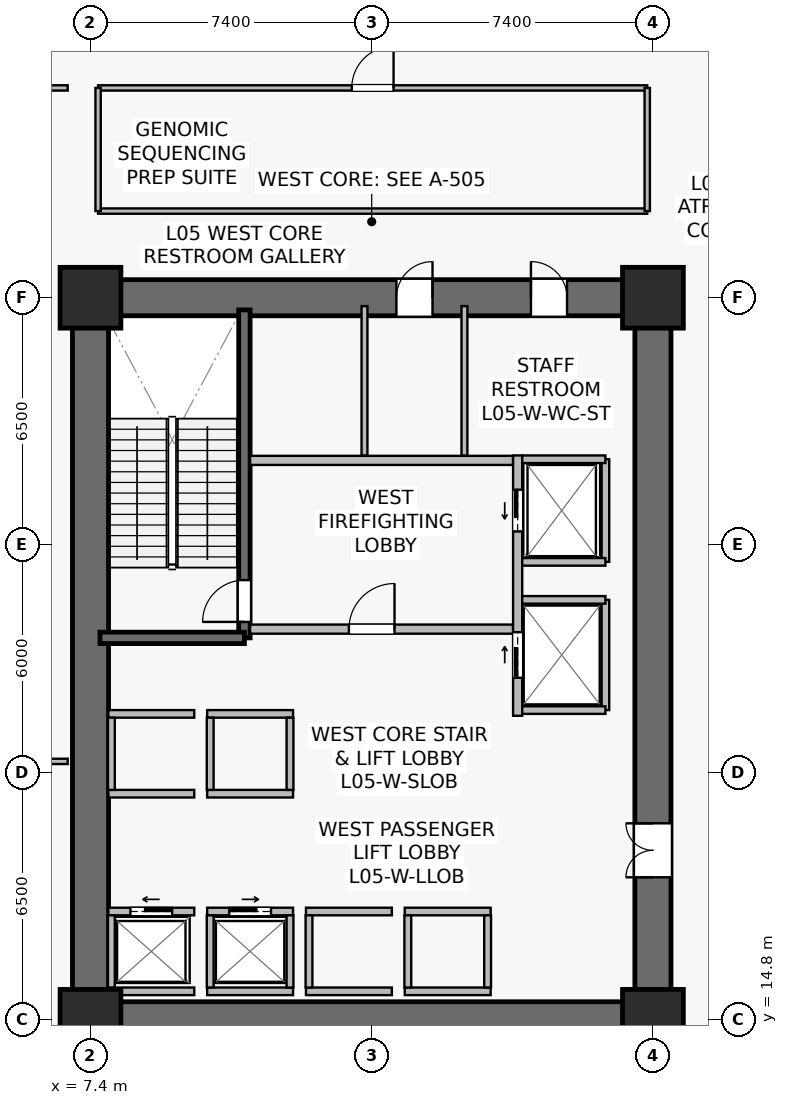
"""IFC4 building model, lengths in metres.
Left out: names, types, materials, properties, quantities, classifications, styles, units other than length and angle.
Written with IfcOpenShell. Run it as: python <this file> out.ifc"""

import sys

from ifc_helpers import new_model, si_unit, direction, frame, frame_2d, origin, origin_2d, place, context, subcontext, project, spatial, rectangle, extrude, source, transform, mapped, element, fill, save


model = new_model("IFC4")
c1 = context("Model", 3, precision=1e-05, world=origin(), true_north=direction((0.0, 1.0)))
c2 = subcontext(c1, "Body", "Model", "MODEL_VIEW")
j1 = project(units=[si_unit("LENGTHUNIT", "METRE"), si_unit("PLANEANGLEUNIT", "RADIAN")], contexts=[c1])
p1 = place(None, origin())
s1 = spatial("IfcSite", under=j1, at=p1, CompositionType="ELEMENT")
p2 = place(p1, origin())
s2 = spatial("IfcBuilding", under=s1, at=p2, CompositionType="ELEMENT")
p3 = place(p2, frame((0.0, 0.0, 19.8)))
s3 = spatial("IfcBuildingStorey", under=s2, at=p3, CompositionType="ELEMENT", Elevation=19.8)
p4 = place(p3, frame((6.925, 14.8, 0.0), z_axis=(0.0, 0.0, 1.0), x_axis=(1.0, 0.0, 0.0)))
e1 = element("IfcWall", 1, at=p4, inside=s3, PredefinedType="SHEAR", context=c2, shape_type="SweptSolid", body=[
    extrude(rectangle(XDim=15.75, YDim=0.95, at=frame_2d((7.875, 0.0))), origin(), (0.0, 0.0, 1.0), 5.08),
])
p5 = place(p3, frame((6.925, 33.8, 0.0), z_axis=(0.0, 0.0, 1.0), x_axis=(1.0, 0.0, 0.0)))
e2 = element("IfcWall", 2, at=p5, inside=s3, PredefinedType="SHEAR", context=c2, shape_type="SweptSolid", body=[
    extrude(rectangle(XDim=15.75, YDim=0.95, at=frame_2d((7.875, 0.0))), origin(), (0.0, 0.0, 1.0), 5.08),
])
p6 = place(p5, frame((8.525, 0.0, 0.0)))
e3 = element("IfcOpeningElement", 3, at=p6, cuts=e2, PredefinedType="OPENING", context=c2, shape_type="SweptSolid", body=[
    extrude(rectangle(XDim=0.95, YDim=2.15, at=frame_2d((0.475, 1.075))), frame((0.0, 0.485, 0.0), z_axis=(0.0, -1.0, 0.0), x_axis=(1.0, 0.0, 0.0)), (0.0, 0.0, 1.0), 0.97),
])
p7 = place(p5, frame((12.065, 0.0, 0.0)))
e4 = element("IfcOpeningElement", 4, at=p7, cuts=e2, PredefinedType="OPENING", context=c2, shape_type="SweptSolid", body=[
    extrude(rectangle(XDim=0.95, YDim=2.15, at=frame_2d((0.475, 1.075))), frame((0.0, 0.485, 0.0), z_axis=(0.0, -1.0, 0.0), x_axis=(1.0, 0.0, 0.0)), (0.0, 0.0, 1.0), 0.97),
])
p8 = place(p3, frame((7.4, 15.275, 0.0), z_axis=(0.0, 0.0, 1.0), x_axis=(0.0, 1.0, 0.0)))
e5 = element("IfcWall", 5, at=p8, inside=s3, PredefinedType="SHEAR", context=c2, shape_type="SweptSolid", body=[
    extrude(rectangle(XDim=18.05, YDim=0.95, at=frame_2d((9.025, 0.0))), origin(), (0.0, 0.0, 1.0), 5.08),
])
p9 = place(p3, frame((22.2, 15.275, 0.0), z_axis=(0.0, 0.0, 1.0), x_axis=(0.0, 1.0, 0.0)))
e6 = element("IfcWall", 6, at=p9, inside=s3, PredefinedType="SHEAR", context=c2, shape_type="SweptSolid", body=[
    extrude(rectangle(XDim=18.05, YDim=0.95, at=frame_2d((9.025, 0.0))), origin(), (0.0, 0.0, 1.0), 5.08),
])
p10 = place(p9, frame((3.275, 0.0, 0.0)))
e7 = element("IfcOpeningElement", 7, at=p10, cuts=e6, PredefinedType="OPENING", context=c2, shape_type="SweptSolid", body=[
    extrude(rectangle(XDim=1.42, YDim=2.2, at=frame_2d((0.71, 1.1))), frame((0.0, 0.485, 0.0), z_axis=(0.0, -1.0, 0.0), x_axis=(1.0, 0.0, 0.0)), (0.0, 0.0, 1.0), 0.97),
])
p11 = place(p3, frame((11.45, 24.85, 0.0), z_axis=(0.0, 0.0, 1.0), x_axis=(0.0, 1.0, 0.0)))
e8 = element("IfcWall", 8, at=p11, inside=s3, PredefinedType="SHEAR", context=c2, shape_type="SweptSolid", body=[
    extrude(rectangle(XDim=8.63, YDim=0.3, at=frame_2d((4.315, 0.0))), origin(), (0.0, 0.0, 1.0), 5.08),
])
p12 = place(p11, frame((0.42, 0.0, 0.0)))
e9 = element("IfcOpeningElement", 9, at=p12, cuts=e8, PredefinedType="OPENING", context=c2, shape_type="SweptSolid", body=[
    extrude(rectangle(XDim=1.1, YDim=2.15, at=frame_2d((0.55, 1.075))), frame((0.0, 0.16, 0.0), z_axis=(0.0, -1.0, 0.0), x_axis=(1.0, 0.0, 0.0)), (0.0, 0.0, 1.0), 0.32),
])
p13 = place(p3, frame((7.65, 24.85, 0.0), z_axis=(0.0, 0.0, 1.0), x_axis=(1.0, 0.0, 0.0)))
e10 = element("IfcWall", 10, at=p13, inside=s3, PredefinedType="SHEAR", context=c2, shape_type="SweptSolid", body=[
    extrude(rectangle(XDim=3.8, YDim=0.3, at=frame_2d((1.9, 0.0))), origin(), (0.0, 0.0, 1.0), 5.08),
])
m1 = source(origin(), c2, "Body", "SweptSolid", [
    extrude(rectangle(XDim=1.6, YDim=1.6, at=origin_2d()), origin(), (0.0, 0.0, 1.0), 5.4),
])
for number, where, z_axis, x_axis in (
    (11, (7.4, 14.8, 0.0), (0.0, 0.0, 1.0), (1.0, 0.0, 0.0)),
    (12, (22.2, 14.8, 0.0), (0.0, 0.0, 1.0), (1.0, 0.0, 0.0)),
    (13, (7.4, 33.8, 0.0), (0.0, 0.0, 1.0), (1.0, 0.0, 0.0)),
    (14, (22.2, 33.8, 0.0), (0.0, 0.0, 1.0), (1.0, 0.0, 0.0)),
):
    element("IfcColumn", number, at=place(p3, frame(where, z_axis=z_axis, x_axis=x_axis)), inside=s3, PredefinedType="COLUMN", context=c2, shape_type="MappedRepresentation", body=[
        mapped(m1, transform((0.0, 0.0, 0.0), scale=1.0)),
    ])
p14 = place(p3, frame((11.6, 25.08, 0.0), z_axis=(0.0, 0.0, 1.0), x_axis=(1.0, 0.0, 0.0)))
e15 = element("IfcWall", 15, at=p14, inside=s3, PredefinedType="SOLIDWALL", context=c2, shape_type="SweptSolid", body=[
    extrude(rectangle(XDim=6.92, YDim=0.24, at=frame_2d((3.46, 0.0))), origin(), (0.0, 0.0, 1.0), 4.365),
])
p15 = place(p14, frame((2.6, 0.0, 0.0)))
e16 = element("IfcOpeningElement", 16, at=p15, cuts=e15, PredefinedType="OPENING", context=c2, shape_type="SweptSolid", body=[
    extrude(rectangle(XDim=1.2, YDim=2.16, at=frame_2d((0.6, 1.08))), frame((0.0, 0.13, 0.0), z_axis=(0.0, -1.0, 0.0), x_axis=(1.0, 0.0, 0.0)), (0.0, 0.0, 1.0), 0.26),
])
p16 = place(p3, frame((11.6, 29.52, 0.0), z_axis=(0.0, 0.0, 1.0), x_axis=(1.0, 0.0, 0.0)))
e17 = element("IfcWall", 17, at=p16, inside=s3, PredefinedType="SOLIDWALL", context=c2, shape_type="SweptSolid", body=[
    extrude(rectangle(XDim=6.92, YDim=0.24, at=frame_2d((3.46, 0.0))), origin(), (0.0, 0.0, 1.0), 4.365),
])
p17 = place(p3, frame((18.64, 22.8, 0.0), z_axis=(0.0, 0.0, 1.0), x_axis=(0.0, 1.0, 0.0)))
e18 = element("IfcWall", 18, at=p17, inside=s3, PredefinedType="SOLIDWALL", context=c2, shape_type="SweptSolid", body=[
    extrude(rectangle(XDim=6.85, YDim=0.24, at=frame_2d((3.425, 0.0))), origin(), (0.0, 0.0, 1.0), 4.165),
])
p18 = place(p17, frame((4.85, 0.0, 0.0)))
e19 = element("IfcOpeningElement", 19, at=p18, cuts=e18, PredefinedType="OPENING", context=c2, shape_type="SweptSolid", body=[
    extrude(rectangle(XDim=1.1, YDim=2.22, at=frame_2d((0.55, 1.11))), frame((0.0, 0.13, 0.0), z_axis=(0.0, -1.0, 0.0), x_axis=(1.0, 0.0, 0.0)), (0.0, 0.0, 1.0), 0.26),
])
p19 = place(p17, frame((1.0, 0.0, 0.0)))
e20 = element("IfcOpeningElement", 20, at=p19, cuts=e18, PredefinedType="OPENING", context=c2, shape_type="SweptSolid", body=[
    extrude(rectangle(XDim=1.2, YDim=2.22, at=frame_2d((0.6, 1.11))), frame((0.0, 0.13, 0.0), z_axis=(0.0, -1.0, 0.0), x_axis=(1.0, 0.0, 0.0)), (0.0, 0.0, 1.0), 0.26),
])
p20 = place(p3, frame((7.87, 17.65, 0.0), z_axis=(0.0, 0.0, 1.0), x_axis=(1.0, 0.0, 0.0)))
e21 = element("IfcWall", 21, at=p20, inside=s3, PredefinedType="SOLIDWALL", context=c2, shape_type="SweptSolid", body=[
    extrude(rectangle(XDim=2.26, YDim=0.2, at=frame_2d((1.13, 0.0))), origin(), (0.0, 0.0, 1.0), 5.08),
])
p21 = place(p20, frame((0.58, 0.0, 0.0)))
e22 = element("IfcOpeningElement", 22, at=p21, cuts=e21, PredefinedType="OPENING", context=c2, shape_type="SweptSolid", body=[
    extrude(rectangle(XDim=1.1, YDim=2.22, at=frame_2d((0.55, 1.11))), frame((0.0, 0.11, 0.0), z_axis=(0.0, -1.0, 0.0), x_axis=(1.0, 0.0, 0.0)), (0.0, 0.0, 1.0), 0.22),
])
p22 = place(p3, frame((7.87, 15.55, 0.0), z_axis=(0.0, 0.0, 1.0), x_axis=(1.0, 0.0, 0.0)))
e23 = element("IfcWall", 23, at=p22, inside=s3, PredefinedType="SOLIDWALL", context=c2, shape_type="SweptSolid", body=[
    extrude(rectangle(XDim=2.26, YDim=0.2, at=frame_2d((1.13, 0.0))), origin(), (0.0, 0.0, 1.0), 5.08),
])
p23 = place(p3, frame((7.95, 15.65, 0.0), z_axis=(0.0, 0.0, 1.0), x_axis=(0.0, 1.0, 0.0)))
e24 = element("IfcWall", 24, at=p23, inside=s3, PredefinedType="SOLIDWALL", context=c2, shape_type="SweptSolid", body=[
    extrude(rectangle(XDim=1.9, YDim=0.18, at=frame_2d((0.95, 0.0))), origin(), (0.0, 0.0, 1.0), 5.08),
])
p24 = place(p3, frame((10.47, 17.65, 0.0), z_axis=(0.0, 0.0, 1.0), x_axis=(1.0, 0.0, 0.0)))
e25 = element("IfcWall", 25, at=p24, inside=s3, PredefinedType="SOLIDWALL", context=c2, shape_type="SweptSolid", body=[
    extrude(rectangle(XDim=2.26, YDim=0.2, at=frame_2d((1.13, 0.0))), origin(), (0.0, 0.0, 1.0), 5.08),
])
p25 = place(p24, frame((0.58, 0.0, 0.0)))
e26 = element("IfcOpeningElement", 26, at=p25, cuts=e25, PredefinedType="OPENING", context=c2, shape_type="SweptSolid", body=[
    extrude(rectangle(XDim=1.1, YDim=2.22, at=frame_2d((0.55, 1.11))), frame((0.0, 0.11, 0.0), z_axis=(0.0, -1.0, 0.0), x_axis=(1.0, 0.0, 0.0)), (0.0, 0.0, 1.0), 0.22),
])
p26 = place(p3, frame((10.47, 15.55, 0.0), z_axis=(0.0, 0.0, 1.0), x_axis=(1.0, 0.0, 0.0)))
e27 = element("IfcWall", 27, at=p26, inside=s3, PredefinedType="SOLIDWALL", context=c2, shape_type="SweptSolid", body=[
    extrude(rectangle(XDim=2.26, YDim=0.2, at=frame_2d((1.13, 0.0))), origin(), (0.0, 0.0, 1.0), 5.08),
])
for number, where, z_axis, x_axis in (
    (28, (10.55, 15.65, 0.0), (0.0, 0.0, 1.0), (0.0, 1.0, 0.0)),
    (29, (12.65, 15.65, 0.0), (0.0, 0.0, 1.0), (0.0, 1.0, 0.0)),
):
    element("IfcWall", number, at=place(p3, frame(where, z_axis=z_axis, x_axis=x_axis)), inside=s3, PredefinedType="SOLIDWALL", context=c2, shape_type="SweptSolid", body=[
        extrude(rectangle(XDim=1.9, YDim=0.18, at=frame_2d((0.95, 0.0))), origin(), (0.0, 0.0, 1.0), 5.08),
    ])
for number, where, z_axis, x_axis in (
    (30, (13.07, 17.65, 0.0), (0.0, 0.0, 1.0), (1.0, 0.0, 0.0)),
    (31, (13.07, 15.55, 0.0), (0.0, 0.0, 1.0), (1.0, 0.0, 0.0)),
):
    element("IfcWall", number, at=place(p3, frame(where, z_axis=z_axis, x_axis=x_axis)), inside=s3, PredefinedType="SOLIDWALL", context=c2, shape_type="SweptSolid", body=[
        extrude(rectangle(XDim=2.26, YDim=0.2, at=frame_2d((1.13, 0.0))), origin(), (0.0, 0.0, 1.0), 4.365),
    ])
p27 = place(p3, frame((13.15, 15.65, 0.0), z_axis=(0.0, 0.0, 1.0), x_axis=(0.0, 1.0, 0.0)))
e32 = element("IfcWall", 32, at=p27, inside=s3, PredefinedType="SOLIDWALL", context=c2, shape_type="SweptSolid", body=[
    extrude(rectangle(XDim=1.9, YDim=0.18, at=frame_2d((0.95, 0.0))), origin(), (0.0, 0.0, 1.0), 5.08),
])
for number, where, z_axis, x_axis in (
    (33, (15.67, 17.65, 0.0), (0.0, 0.0, 1.0), (1.0, 0.0, 0.0)),
    (34, (15.67, 15.55, 0.0), (0.0, 0.0, 1.0), (1.0, 0.0, 0.0)),
):
    element("IfcWall", number, at=place(p3, frame(where, z_axis=z_axis, x_axis=x_axis)), inside=s3, PredefinedType="SOLIDWALL", context=c2, shape_type="SweptSolid", body=[
        extrude(rectangle(XDim=2.26, YDim=0.2, at=frame_2d((1.13, 0.0))), origin(), (0.0, 0.0, 1.0), 5.08),
    ])
for number, where, z_axis, x_axis in (
    (35, (15.75, 15.65, 0.0), (0.0, 0.0, 1.0), (0.0, 1.0, 0.0)),
    (36, (17.85, 15.65, 0.0), (0.0, 0.0, 1.0), (0.0, 1.0, 0.0)),
):
    element("IfcWall", number, at=place(p3, frame(where, z_axis=z_axis, x_axis=x_axis)), inside=s3, PredefinedType="SOLIDWALL", context=c2, shape_type="SweptSolid", body=[
        extrude(rectangle(XDim=1.9, YDim=0.18, at=frame_2d((0.95, 0.0))), origin(), (0.0, 0.0, 1.0), 5.08),
    ])
for number, where, z_axis, x_axis in (
    (37, (7.87, 20.75, 0.0), (0.0, 0.0, 1.0), (1.0, 0.0, 0.0)),
    (38, (7.87, 22.85, 0.0), (0.0, 0.0, 1.0), (1.0, 0.0, 0.0)),
):
    element("IfcWall", number, at=place(p3, frame(where, z_axis=z_axis, x_axis=x_axis)), inside=s3, PredefinedType="SOLIDWALL", context=c2, shape_type="SweptSolid", body=[
        extrude(rectangle(XDim=2.26, YDim=0.2, at=frame_2d((1.13, 0.0))), origin(), (0.0, 0.0, 1.0), 5.08),
    ])
p28 = place(p3, frame((7.95, 20.85, 0.0), z_axis=(0.0, 0.0, 1.0), x_axis=(0.0, 1.0, 0.0)))
e39 = element("IfcWall", 39, at=p28, inside=s3, PredefinedType="SOLIDWALL", context=c2, shape_type="SweptSolid", body=[
    extrude(rectangle(XDim=1.9, YDim=0.18, at=frame_2d((0.95, 0.0))), origin(), (0.0, 0.0, 1.0), 5.08),
])
for number, where, z_axis, x_axis in (
    (40, (10.47, 20.75, 0.0), (0.0, 0.0, 1.0), (1.0, 0.0, 0.0)),
    (41, (10.47, 22.85, 0.0), (0.0, 0.0, 1.0), (1.0, 0.0, 0.0)),
):
    element("IfcWall", number, at=place(p3, frame(where, z_axis=z_axis, x_axis=x_axis)), inside=s3, PredefinedType="SOLIDWALL", context=c2, shape_type="SweptSolid", body=[
        extrude(rectangle(XDim=2.26, YDim=0.2, at=frame_2d((1.13, 0.0))), origin(), (0.0, 0.0, 1.0), 5.08),
    ])
for number, where, z_axis, x_axis in (
    (42, (10.55, 20.85, 0.0), (0.0, 0.0, 1.0), (0.0, 1.0, 0.0)),
    (43, (12.65, 20.85, 0.0), (0.0, 0.0, 1.0), (0.0, 1.0, 0.0)),
):
    element("IfcWall", number, at=place(p3, frame(where, z_axis=z_axis, x_axis=x_axis)), inside=s3, PredefinedType="SOLIDWALL", context=c2, shape_type="SweptSolid", body=[
        extrude(rectangle(XDim=1.9, YDim=0.18, at=frame_2d((0.95, 0.0))), origin(), (0.0, 0.0, 1.0), 5.08),
    ])
p29 = place(p3, frame((20.95, 26.85, 0.0), z_axis=(0.0, 0.0, 1.0), x_axis=(0.0, 1.0, 0.0)))
e44 = element("IfcWall", 44, at=p29, inside=s3, PredefinedType="SOLIDWALL", context=c2, shape_type="SweptSolid", body=[
    extrude(rectangle(XDim=2.7, YDim=0.2, at=frame_2d((1.35, 0.0))), origin(), (0.0, 0.0, 1.0), 5.08),
])
p30 = place(p3, frame((18.76, 29.55, 0.0), z_axis=(0.0, 0.0, 1.0), x_axis=(1.0, 0.0, 0.0)))
e45 = element("IfcWall", 45, at=p30, inside=s3, PredefinedType="SOLIDWALL", context=c2, shape_type="SweptSolid", body=[
    extrude(rectangle(XDim=2.19, YDim=0.2, at=frame_2d((1.095, 0.0))), origin(), (0.0, 0.0, 1.0), 5.08),
])
p31 = place(p3, frame((18.76, 26.85, 0.0), z_axis=(0.0, 0.0, 1.0), x_axis=(1.0, 0.0, 0.0)))
e46 = element("IfcWall", 46, at=p31, inside=s3, PredefinedType="SOLIDWALL", context=c2, shape_type="SweptSolid", body=[
    extrude(rectangle(XDim=2.19, YDim=0.2, at=frame_2d((1.095, 0.0))), origin(), (0.0, 0.0, 1.0), 4.477),
])
p32 = place(p3, frame((20.95, 22.95, 0.0), z_axis=(0.0, 0.0, 1.0), x_axis=(0.0, 1.0, 0.0)))
e47 = element("IfcWall", 47, at=p32, inside=s3, PredefinedType="SOLIDWALL", context=c2, shape_type="SweptSolid", body=[
    extrude(rectangle(XDim=2.9, YDim=0.2, at=frame_2d((1.45, 0.0))), origin(), (0.0, 0.0, 1.0), 4.165),
])
for number, where, z_axis, x_axis in (
    (48, (18.76, 25.85, 0.0), (0.0, 0.0, 1.0), (1.0, 0.0, 0.0)),
    (49, (18.76, 22.95, 0.0), (0.0, 0.0, 1.0), (1.0, 0.0, 0.0)),
):
    element("IfcWall", number, at=place(p3, frame(where, z_axis=z_axis, x_axis=x_axis)), inside=s3, PredefinedType="SOLIDWALL", context=c2, shape_type="SweptSolid", body=[
        extrude(rectangle(XDim=2.19, YDim=0.2, at=frame_2d((1.095, 0.0))), origin(), (0.0, 0.0, 1.0), 5.08),
    ])
p33 = place(p3, frame((14.61, 29.65, 0.0), z_axis=(0.0, 0.0, 1.0), x_axis=(0.0, 1.0, 0.0)))
e50 = element("IfcWall", 50, at=p33, inside=s3, PredefinedType="PLUMBINGWALL", context=c2, shape_type="SweptSolid", body=[
    extrude(rectangle(XDim=3.93, YDim=0.155, at=frame_2d((1.965, 0.0))), origin(), (0.0, 0.0, 1.0), 4.365),
])
p34 = place(p3, frame((17.24, 29.65, 0.0), z_axis=(0.0, 0.0, 1.0), x_axis=(0.0, 1.0, 0.0)))
e51 = element("IfcWall", 51, at=p34, inside=s3, PredefinedType="PLUMBINGWALL", context=c2, shape_type="SweptSolid", body=[
    extrude(rectangle(XDim=3.93, YDim=0.155, at=frame_2d((1.965, 0.0))), origin(), (0.0, 0.0, 1.0), 5.08),
])
p35 = place(p3, frame((7.6, 39.32, 0.0), z_axis=(0.0, 0.0, 1.0), x_axis=(1.0, 0.0, 0.0)))
e52 = element("IfcWall", 52, at=p35, inside=s3, PredefinedType="PARTITIONING", context=c2, shape_type="SweptSolid", body=[
    extrude(rectangle(XDim=14.45, YDim=0.14, at=frame_2d((7.225, 0.0))), origin(), (0.0, 0.0, 1.0), 4.365),
])
p36 = place(p35, frame((6.675, 0.0, 0.0)))
e53 = element("IfcOpeningElement", 53, at=p36, cuts=e52, PredefinedType="OPENING", context=c2, shape_type="SweptSolid", body=[
    extrude(rectangle(XDim=1.1, YDim=2.18, at=frame_2d((0.55, 1.09))), frame((0.0, 0.08, 0.0), z_axis=(0.0, -1.0, 0.0), x_axis=(1.0, 0.0, 0.0)), (0.0, 0.0, 1.0), 0.16),
])
p37 = place(p3, frame((7.6, 36.08, 0.0), z_axis=(0.0, 0.0, 1.0), x_axis=(1.0, 0.0, 0.0)))
e54 = element("IfcWall", 54, at=p37, inside=s3, PredefinedType="PARTITIONING", context=c2, shape_type="SweptSolid", body=[
    extrude(rectangle(XDim=14.45, YDim=0.14, at=frame_2d((7.225, 0.0))), origin(), (0.0, 0.0, 1.0), 4.365),
])
for number, where, z_axis, x_axis in (
    (55, (7.6, 36.08, 0.0), (0.0, 0.0, 1.0), (0.0, 1.0, 0.0)),
    (56, (22.05, 36.08, 0.0), (0.0, 0.0, 1.0), (0.0, 1.0, 0.0)),
):
    element("IfcWall", number, at=place(p3, frame(where, z_axis=z_axis, x_axis=x_axis)), inside=s3, PredefinedType="PARTITIONING", context=c2, shape_type="SweptSolid", body=[
        extrude(rectangle(XDim=3.24, YDim=0.14, at=frame_2d((1.62, 0.0))), origin(), (0.0, 0.0, 1.0), 4.365),
    ])
p38 = place(p3, frame((-0.85, 21.6, 0.0), z_axis=(0.0, 0.0, 1.0), x_axis=(1.0, 0.0, 0.0)))
e57 = element("IfcWall", 57, at=p38, inside=s3, PredefinedType="PARTITIONING", context=c2, shape_type="SweptSolid", body=[
    extrude(rectangle(XDim=7.65, YDim=0.14, at=frame_2d((3.825, 0.0))), origin(), (0.0, 0.0, 1.0), 4.465),
])
p39 = place(p3, frame((4.7, 39.32, 0.0), z_axis=(0.0, 0.0, 1.0), x_axis=(1.0, 0.0, 0.0)))
e58 = element("IfcWall", 58, at=p39, inside=s3, PredefinedType="PARTITIONING", context=c2, shape_type="SweptSolid", body=[
    extrude(rectangle(XDim=2.1, YDim=0.14, at=frame_2d((1.05, 0.0))), origin(), (0.0, 0.0, 1.0), 5.08),
])
p40 = place(p39, frame((0.55, 0.0, 0.0)))
e59 = element("IfcOpeningElement", 59, at=p40, cuts=e58, PredefinedType="OPENING", context=c2, shape_type="SweptSolid", body=[
    extrude(rectangle(XDim=1.0, YDim=2.15, at=frame_2d((0.5, 1.075))), frame((0.0, 0.08, 0.0), z_axis=(0.0, -1.0, 0.0), x_axis=(1.0, 0.0, 0.0)), (0.0, 0.0, 1.0), 0.16),
])
m2 = source(origin(), c2, "Body", "SweptSolid", [
    extrude(rectangle(XDim=1.1, YDim=2.15, at=frame_2d((0.55, 1.075))), frame((0.0, 0.025, 0.0), z_axis=(0.0, -1.0, 0.0), x_axis=(1.0, 0.0, 0.0)), (0.0, 0.0, 1.0), 0.05),
])
p41 = place(p12, origin())
e60 = element("IfcDoor", 60, at=p41, inside=s3, OperationType="SINGLE_SWING_LEFT", PredefinedType="DOOR", context=c2, shape_type="MappedRepresentation", body=[
    mapped(m2, transform((0.0, 0.0, 0.0), scale=1.0)),
])
fill(e9, e60)
m3 = source(origin(), c2, "Body", "SweptSolid", [
    extrude(rectangle(XDim=1.2, YDim=2.16, at=frame_2d((0.6, 1.08))), frame((0.0, 0.025, 0.0), z_axis=(0.0, -1.0, 0.0), x_axis=(1.0, 0.0, 0.0)), (0.0, 0.0, 1.0), 0.05),
])
p42 = place(p15, origin())
e61 = element("IfcDoor", 61, at=p42, inside=s3, OperationType="SINGLE_SWING_RIGHT", PredefinedType="DOOR", context=c2, shape_type="MappedRepresentation", body=[
    mapped(m3, transform((0.0, 0.0, 0.0), scale=1.0)),
])
fill(e16, e61)
m4 = source(origin(), c2, "Body", "SweptSolid", [
    extrude(rectangle(XDim=1.1, YDim=2.22, at=frame_2d((0.55, 1.11))), frame((0.0, 0.025, 0.0), z_axis=(0.0, -1.0, 0.0), x_axis=(1.0, 0.0, 0.0)), (0.0, 0.0, 1.0), 0.05),
])
p43 = place(p21, origin())
e62 = element("IfcDoor", 62, at=p43, inside=s3, OperationType="SLIDING_TO_LEFT", PredefinedType="USERDEFINED", context=c2, shape_type="MappedRepresentation", body=[
    mapped(m4, transform((0.0, 0.0, 0.0), scale=1.0)),
])
fill(e22, e62)
p44 = place(p25, origin())
e63 = element("IfcDoor", 63, at=p44, inside=s3, OperationType="SLIDING_TO_RIGHT", PredefinedType="USERDEFINED", context=c2, shape_type="MappedRepresentation", body=[
    mapped(m4, transform((0.0, 0.0, 0.0), scale=1.0)),
])
fill(e26, e63)
p45 = place(p18, origin())
e64 = element("IfcDoor", 64, at=p45, inside=s3, OperationType="SLIDING_TO_LEFT", PredefinedType="USERDEFINED", context=c2, shape_type="MappedRepresentation", body=[
    mapped(m4, transform((0.0, 0.0, 0.0), scale=1.0)),
])
fill(e19, e64)
m5 = source(origin(), c2, "Body", "SweptSolid", [
    extrude(rectangle(XDim=1.2, YDim=2.22, at=frame_2d((0.6, 1.11))), frame((0.0, 0.025, 0.0), z_axis=(0.0, -1.0, 0.0), x_axis=(1.0, 0.0, 0.0)), (0.0, 0.0, 1.0), 0.05),
])
p46 = place(p19, origin())
e65 = element("IfcDoor", 65, at=p46, inside=s3, OperationType="SLIDING_TO_RIGHT", PredefinedType="USERDEFINED", context=c2, shape_type="MappedRepresentation", body=[
    mapped(m5, transform((0.0, 0.0, 0.0), scale=1.0)),
])
fill(e20, e65)
m6 = source(origin(), c2, "Body", "SweptSolid", [
    extrude(rectangle(XDim=1.42, YDim=2.2, at=frame_2d((0.71, 1.1))), frame((0.0, 0.025, 0.0), z_axis=(0.0, -1.0, 0.0), x_axis=(1.0, 0.0, 0.0)), (0.0, 0.0, 1.0), 0.05),
])
p47 = place(p10, origin())
e66 = element("IfcDoor", 66, at=p47, inside=s3, OperationType="DOUBLE_DOOR_SINGLE_SWING", PredefinedType="DOOR", context=c2, shape_type="MappedRepresentation", body=[
    mapped(m6, transform((0.0, 0.0, 0.0), scale=1.0)),
])
fill(e7, e66)
m7 = source(origin(), c2, "Body", "SweptSolid", [
    extrude(rectangle(XDim=0.95, YDim=2.15, at=frame_2d((0.475, 1.075))), frame((0.0, 0.025, 0.0), z_axis=(0.0, -1.0, 0.0), x_axis=(1.0, 0.0, 0.0)), (0.0, 0.0, 1.0), 0.05),
])
p48 = place(p6, origin())
e67 = element("IfcDoor", 67, at=p48, inside=s3, OperationType="SINGLE_SWING_RIGHT", PredefinedType="DOOR", context=c2, shape_type="MappedRepresentation", body=[
    mapped(m7, transform((0.0, 0.0, 0.0), scale=1.0)),
])
fill(e3, e67)
p49 = place(p7, origin())
e68 = element("IfcDoor", 68, at=p49, inside=s3, OperationType="SINGLE_SWING_LEFT", PredefinedType="DOOR", context=c2, shape_type="MappedRepresentation", body=[
    mapped(m7, transform((0.0, 0.0, 0.0), scale=1.0)),
])
fill(e4, e68)
m8 = source(origin(), c2, "Body", "SweptSolid", [
    extrude(rectangle(XDim=1.1, YDim=2.18, at=frame_2d((0.55, 1.09))), frame((0.0, 0.025, 0.0), z_axis=(0.0, -1.0, 0.0), x_axis=(1.0, 0.0, 0.0)), (0.0, 0.0, 1.0), 0.05),
])
p50 = place(p36, origin())
e69 = element("IfcDoor", 69, at=p50, inside=s3, OperationType="SINGLE_SWING_RIGHT", PredefinedType="DOOR", context=c2, shape_type="MappedRepresentation", body=[
    mapped(m8, transform((0.0, 0.0, 0.0), scale=1.0)),
])
fill(e53, e69)
save(model, sys.argv[1])
